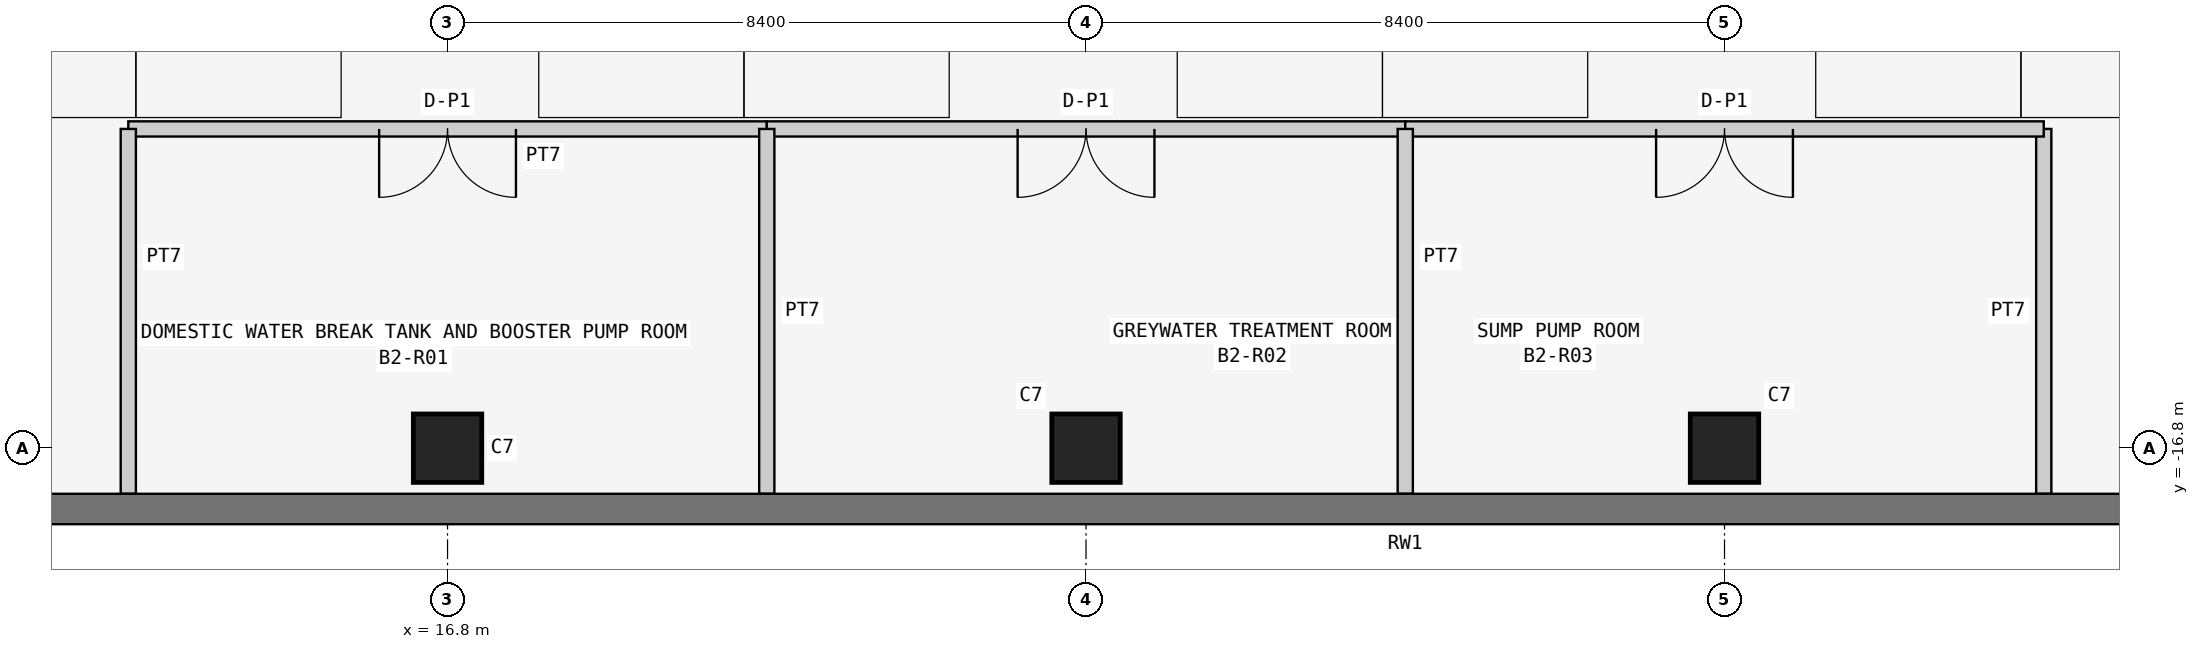
"""IFC4 building model, lengths in metres.
Left out: names, types, materials, properties, quantities, classifications, styles, units other than length and angle.
Written with IfcOpenShell. Run it as: python <this file> out.ifc"""

import sys

from ifc_helpers import new_model, si_unit, direction, frame, frame_2d, origin, origin_2d, place, context, subcontext, project, spatial, rectangle, extrude, element, fill, save


model = new_model("IFC4")
c1 = context("Model", 3, precision=1e-05, world=origin(), true_north=direction((0.0, 1.0)))
c2 = subcontext(c1, "Body", "Model", "MODEL_VIEW")
j1 = project(units=[si_unit("LENGTHUNIT", "METRE"), si_unit("PLANEANGLEUNIT", "RADIAN")], contexts=[c1])
p1 = place(None, origin())
s1 = spatial("IfcSite", under=j1, at=p1, CompositionType="ELEMENT")
p2 = place(p1, origin())
s2 = spatial("IfcBuilding", under=s1, at=p2, CompositionType="ELEMENT")
p3 = place(p2, frame((0.0, 0.0, -7.2)))
s3 = spatial("IfcBuildingStorey", under=s2, at=p3, CompositionType="ELEMENT", Elevation=-7.2)
for number, where, z_axis, x_axis in (
    (1, (16.8, -16.8, -0.4), (0.0, 0.0, 1.0), (1.0, 0.0, 0.0)),
    (2, (25.2, -16.8, -0.4), (0.0, 0.0, 1.0), (1.0, 0.0, 0.0)),
    (3, (33.6, -16.8, -0.4), (0.0, 0.0, 1.0), (1.0, 0.0, 0.0)),
):
    element("IfcColumn", number, at=place(p3, frame(where, z_axis=z_axis, x_axis=x_axis)), inside=s3, PredefinedType="COLUMN", context=c2, shape_type="SweptSolid", body=[
        extrude(rectangle(XDim=0.9, YDim=0.9, at=origin_2d()), origin(), (0.0, 0.0, 1.0), 4.0),
    ])
p4 = place(p3, frame((0.4, -17.6, -0.4), z_axis=(0.0, 0.0, 1.0), x_axis=(1.0, 0.0, 0.0)))
e4 = element("IfcWall", 4, at=p4, inside=s3, PredefinedType="SOLIDWALL", context=c2, shape_type="SweptSolid", body=[
    extrude(rectangle(XDim=58.0, YDim=0.4, at=frame_2d((29.0, 0.0))), origin(), (0.0, 0.0, 1.0), 4.0),
])
p5 = place(p3, frame((21.0, -12.6, 0.0), z_axis=(0.0, 0.0, 1.0), x_axis=(-1.0, 0.0, 0.0)))
e5 = element("IfcWall", 5, at=p5, inside=s3, PredefinedType="PARTITIONING", context=c2, shape_type="SweptSolid", body=[
    extrude(rectangle(XDim=8.4, YDim=0.2, at=frame_2d((4.2, 0.0))), origin(), (0.0, 0.0, 1.0), 3.35),
])
p6 = place(p5, frame((3.3, 0.0, 0.0)))
e6 = element("IfcOpeningElement", 6, at=p6, cuts=e5, PredefinedType="OPENING", context=c2, shape_type="SweptSolid", body=[
    extrude(rectangle(XDim=1.8, YDim=2.4, at=frame_2d((0.9, 1.2))), frame((0.0, 0.11, 0.0), z_axis=(0.0, -1.0, 0.0), x_axis=(1.0, 0.0, 0.0)), (0.0, 0.0, 1.0), 0.22),
])
p7 = place(p3, frame((12.6, -12.6, 0.0), z_axis=(0.0, 0.0, 1.0), x_axis=(0.0, -1.0, 0.0)))
e7 = element("IfcWall", 7, at=p7, inside=s3, PredefinedType="PARTITIONING", context=c2, shape_type="SweptSolid", body=[
    extrude(rectangle(XDim=4.8, YDim=0.2, at=frame_2d((2.4, 0.0))), origin(), (0.0, 0.0, 1.0), 2.738),
])
p8 = place(p3, frame((29.4, -12.6, 0.0), z_axis=(0.0, 0.0, 1.0), x_axis=(-1.0, 0.0, 0.0)))
e8 = element("IfcWall", 8, at=p8, inside=s3, PredefinedType="PARTITIONING", context=c2, shape_type="SweptSolid", body=[
    extrude(rectangle(XDim=8.4, YDim=0.2, at=frame_2d((4.2, 0.0))), origin(), (0.0, 0.0, 1.0), 3.35),
])
p9 = place(p8, frame((3.3, 0.0, 0.0)))
e9 = element("IfcOpeningElement", 9, at=p9, cuts=e8, PredefinedType="OPENING", context=c2, shape_type="SweptSolid", body=[
    extrude(rectangle(XDim=1.8, YDim=2.4, at=frame_2d((0.9, 1.2))), frame((0.0, 0.11, 0.0), z_axis=(0.0, -1.0, 0.0), x_axis=(1.0, 0.0, 0.0)), (0.0, 0.0, 1.0), 0.22),
])
p10 = place(p3, frame((37.8, -17.4, 0.0), z_axis=(0.0, 0.0, 1.0), x_axis=(0.0, 1.0, 0.0)))
e10 = element("IfcWall", 10, at=p10, inside=s3, PredefinedType="PARTITIONING", context=c2, shape_type="SweptSolid", body=[
    extrude(rectangle(XDim=4.8, YDim=0.2, at=frame_2d((2.4, 0.0))), origin(), (0.0, 0.0, 1.0), 2.738),
])
p11 = place(p3, frame((37.8, -12.6, 0.0), z_axis=(0.0, 0.0, 1.0), x_axis=(-1.0, 0.0, 0.0)))
e11 = element("IfcWall", 11, at=p11, inside=s3, PredefinedType="PARTITIONING", context=c2, shape_type="SweptSolid", body=[
    extrude(rectangle(XDim=8.4, YDim=0.2, at=frame_2d((4.2, 0.0))), origin(), (0.0, 0.0, 1.0), 3.35),
])
p12 = place(p11, frame((3.3, 0.0, 0.0)))
e12 = element("IfcOpeningElement", 12, at=p12, cuts=e11, PredefinedType="OPENING", context=c2, shape_type="SweptSolid", body=[
    extrude(rectangle(XDim=1.8, YDim=2.4, at=frame_2d((0.9, 1.2))), frame((0.0, 0.11, 0.0), z_axis=(0.0, -1.0, 0.0), x_axis=(1.0, 0.0, 0.0)), (0.0, 0.0, 1.0), 0.22),
])
for number, where, z_axis, x_axis in (
    (13, (21.0, -12.6, 0.0), (0.0, 0.0, 1.0), (0.0, -1.0, 0.0)),
    (14, (29.4, -12.6, 0.0), (0.0, 0.0, 1.0), (0.0, -1.0, 0.0)),
):
    element("IfcWall", number, at=place(p3, frame(where, z_axis=z_axis, x_axis=x_axis)), inside=s3, PredefinedType="PARTITIONING", context=c2, shape_type="SweptSolid", body=[
        extrude(rectangle(XDim=4.8, YDim=0.2, at=frame_2d((2.4, 0.0))), origin(), (0.0, 0.0, 1.0), 2.738),
    ])
p13 = place(p6, origin())
e15 = element("IfcDoor", 15, at=p13, inside=s3, OperationType="DOUBLE_DOOR_SINGLE_SWING", PredefinedType="DOOR", context=c2, shape_type="SweptSolid", body=[
    extrude(rectangle(XDim=1.8, YDim=2.4, at=frame_2d((0.9, 1.2))), frame((0.0, 0.025, 0.0), z_axis=(0.0, -1.0, 0.0), x_axis=(1.0, 0.0, 0.0)), (0.0, 0.0, 1.0), 0.05),
])
fill(e6, e15)
p14 = place(p9, origin())
e16 = element("IfcDoor", 16, at=p14, inside=s3, OperationType="DOUBLE_DOOR_SINGLE_SWING", PredefinedType="DOOR", context=c2, shape_type="SweptSolid", body=[
    extrude(rectangle(XDim=1.8, YDim=2.4, at=frame_2d((0.9, 1.2))), frame((0.0, 0.025, 0.0), z_axis=(0.0, -1.0, 0.0), x_axis=(1.0, 0.0, 0.0)), (0.0, 0.0, 1.0), 0.05),
])
fill(e9, e16)
p15 = place(p12, origin())
e17 = element("IfcDoor", 17, at=p15, inside=s3, OperationType="DOUBLE_DOOR_SINGLE_SWING", PredefinedType="DOOR", context=c2, shape_type="SweptSolid", body=[
    extrude(rectangle(XDim=1.8, YDim=2.4, at=frame_2d((0.9, 1.2))), frame((0.0, 0.025, 0.0), z_axis=(0.0, -1.0, 0.0), x_axis=(1.0, 0.0, 0.0)), (0.0, 0.0, 1.0), 0.05),
])
fill(e12, e17)
save(model, sys.argv[1])
